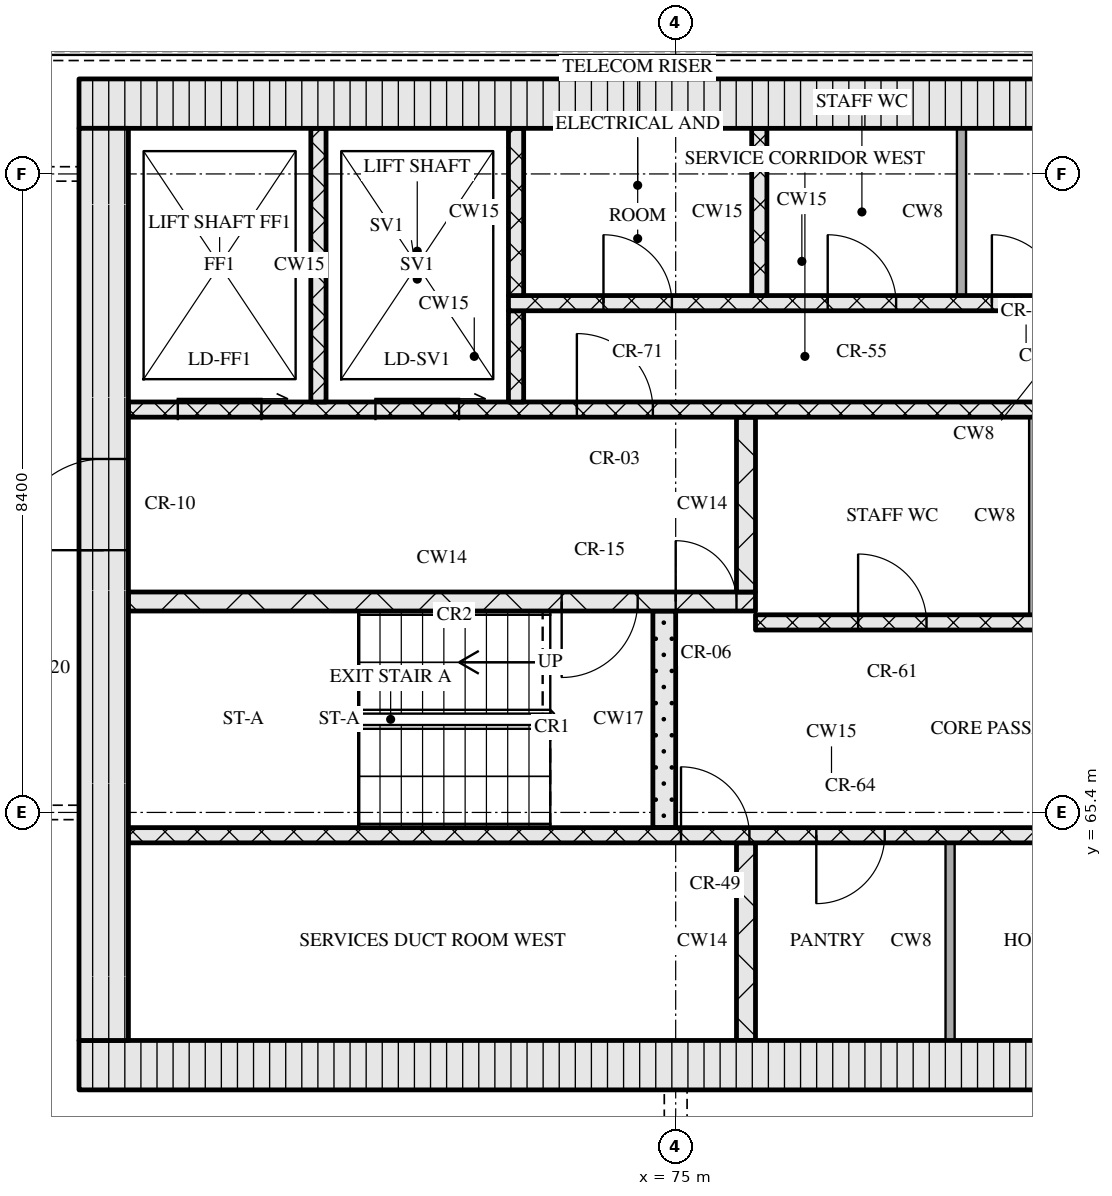
"""IFC4 building model, lengths in metres.
Left out: names, types, materials, properties, quantities, classifications, styles, units other than length and angle.
Written with IfcOpenShell. Run it as: python <this file> out.ifc"""

import sys

from ifc_helpers import new_model, si_unit, direction, frame, frame_2d, origin, place, context, subcontext, project, spatial, rectangle, extrude, element, fill, save


model = new_model("IFC4")
c1 = context("Model", 3, precision=1e-05, world=origin(), true_north=direction((0.0, 1.0)))
c2 = subcontext(c1, "Body", "Model", "MODEL_VIEW")
j1 = project(units=[si_unit("LENGTHUNIT", "METRE"), si_unit("PLANEANGLEUNIT", "RADIAN")], contexts=[c1])
p1 = place(None, origin())
s1 = spatial("IfcSite", under=j1, at=p1, CompositionType="ELEMENT")
p2 = place(p1, origin())
s2 = spatial("IfcBuilding", under=s1, at=p2, CompositionType="ELEMENT")
p3 = place(p2, frame((0.0, 0.0, 234.3)))
s3 = spatial("IfcBuildingStorey", under=s2, at=p3, CompositionType="ELEMENT", Elevation=234.3)
p4 = place(p3, frame((67.15, 62.075, 0.0), z_axis=(0.0, 0.0, 1.0), x_axis=(1.0, 0.0, 0.0)))
e1 = element("IfcWall", 1, at=p4, inside=s3, PredefinedType="SOLIDWALL", context=c2, shape_type="SweptSolid", body=[
    extrude(rectangle(XDim=40.9, YDim=0.65, at=frame_2d((20.45, 0.0))), origin(), (0.0, 0.0, 1.0), 3.32),
])
p5 = place(p4, frame((20.8, 0.0, 0.0)))
e2 = element("IfcOpeningElement", 2, at=p5, cuts=e1, PredefinedType="OPENING", context=c2, shape_type="SweptSolid", body=[
    extrude(rectangle(XDim=1.8, YDim=2.1, at=frame_2d((0.9, 1.05))), frame((0.0, 0.335, 0.0), z_axis=(0.0, -1.0, 0.0), x_axis=(1.0, 0.0, 0.0)), (0.0, 0.0, 1.0), 0.67),
])
p6 = place(p3, frame((67.15, 74.725, 0.0), z_axis=(0.0, 0.0, 1.0), x_axis=(1.0, 0.0, 0.0)))
e3 = element("IfcWall", 3, at=p6, inside=s3, PredefinedType="SOLIDWALL", context=c2, shape_type="SweptSolid", body=[
    extrude(rectangle(XDim=40.9, YDim=0.65, at=frame_2d((20.45, 0.0))), origin(), (0.0, 0.0, 1.0), 3.32),
])
p7 = place(p3, frame((67.475, 62.4, 0.0), z_axis=(0.0, 0.0, 1.0), x_axis=(0.0, 1.0, 0.0)))
e4 = element("IfcWall", 4, at=p7, inside=s3, PredefinedType="SOLIDWALL", context=c2, shape_type="SweptSolid", body=[
    extrude(rectangle(XDim=12.0, YDim=0.65, at=frame_2d((6.0, 0.0))), origin(), (0.0, 0.0, 1.0), 3.32),
])
p8 = place(p7, frame((6.45, 0.0, 0.0)))
e5 = element("IfcOpeningElement", 5, at=p8, cuts=e4, PredefinedType="OPENING", context=c2, shape_type="SweptSolid", body=[
    extrude(rectangle(XDim=1.2, YDim=2.1, at=frame_2d((0.6, 1.05))), frame((0.0, 0.335, 0.0), z_axis=(0.0, -1.0, 0.0), x_axis=(1.0, 0.0, 0.0)), (0.0, 0.0, 1.0), 0.67),
])
p9 = place(p3, frame((75.925, 62.4, 0.0), z_axis=(0.0, 0.0, 1.0), x_axis=(0.0, 1.0, 0.0)))
e6 = element("IfcWall", 6, at=p9, inside=s3, PredefinedType="SOLIDWALL", context=c2, shape_type="SweptSolid", body=[
    extrude(rectangle(XDim=2.6, YDim=0.25, at=frame_2d((1.3, 0.0))), origin(), (0.0, 0.0, 1.0), 3.32),
])
p10 = place(p3, frame((78.61, 62.4, 0.0), z_axis=(0.0, 0.0, 1.0), x_axis=(0.0, 1.0, 0.0)))
e7 = element("IfcWall", 7, at=p10, inside=s3, PredefinedType="PARTITIONING", context=c2, shape_type="SweptSolid", body=[
    extrude(rectangle(XDim=2.6, YDim=0.12, at=frame_2d((1.3, 0.0))), origin(), (0.0, 0.0, 1.0), 3.32),
])
p11 = place(p3, frame((67.8, 65.1, 0.0), z_axis=(0.0, 0.0, 1.0), x_axis=(1.0, 0.0, 0.0)))
e8 = element("IfcWall", 8, at=p11, inside=s3, PredefinedType="SOLIDWALL", context=c2, shape_type="SweptSolid", body=[
    extrude(rectangle(XDim=18.5, YDim=0.2, at=frame_2d((9.25, 0.0))), origin(), (0.0, 0.0, 1.0), 3.32),
])
p12 = place(p11, frame((7.27, 0.0, 0.0)))
e9 = element("IfcOpeningElement", 9, at=p12, cuts=e8, PredefinedType="OPENING", context=c2, shape_type="SweptSolid", body=[
    extrude(rectangle(XDim=0.9, YDim=2.1, at=frame_2d((0.45, 1.05))), frame((0.0, 0.11, 0.0), z_axis=(0.0, -1.0, 0.0), x_axis=(1.0, 0.0, 0.0)), (0.0, 0.0, 1.0), 0.22),
])
p13 = place(p11, frame((9.05, 0.0, 0.0)))
e10 = element("IfcOpeningElement", 10, at=p13, cuts=e8, PredefinedType="OPENING", context=c2, shape_type="SweptSolid", body=[
    extrude(rectangle(XDim=0.9, YDim=2.1, at=frame_2d((0.45, 1.05))), frame((0.0, 0.11, 0.0), z_axis=(0.0, -1.0, 0.0), x_axis=(1.0, 0.0, 0.0)), (0.0, 0.0, 1.0), 0.22),
])
p14 = place(p11, frame((12.76, 0.0, 0.0)))
e11 = element("IfcOpeningElement", 11, at=p14, cuts=e8, PredefinedType="OPENING", context=c2, shape_type="SweptSolid", body=[
    extrude(rectangle(XDim=0.9, YDim=2.1, at=frame_2d((0.45, 1.05))), frame((0.0, 0.11, 0.0), z_axis=(0.0, -1.0, 0.0), x_axis=(1.0, 0.0, 0.0)), (0.0, 0.0, 1.0), 0.22),
])
p15 = place(p11, frame((16.7, 0.0, 0.0)))
e12 = element("IfcOpeningElement", 12, at=p15, cuts=e8, PredefinedType="OPENING", context=c2, shape_type="SweptSolid", body=[
    extrude(rectangle(XDim=0.9, YDim=2.1, at=frame_2d((0.45, 1.05))), frame((0.0, 0.11, 0.0), z_axis=(0.0, -1.0, 0.0), x_axis=(1.0, 0.0, 0.0)), (0.0, 0.0, 1.0), 0.22),
])
p16 = place(p3, frame((74.85, 65.2, 0.0), z_axis=(0.0, 0.0, 1.0), x_axis=(0.0, 1.0, 0.0)))
e13 = element("IfcWall", 13, at=p16, inside=s3, PredefinedType="SOLIDWALL", context=c2, shape_type="SweptSolid", body=[
    extrude(rectangle(XDim=2.85, YDim=0.3, at=frame_2d((1.425, 0.0))), origin(), (0.0, 0.0, 1.0), 3.32),
])
p17 = place(p3, frame((76.05, 67.9, 0.0), z_axis=(0.0, 0.0, 1.0), x_axis=(1.0, 0.0, 0.0)))
e14 = element("IfcWall", 14, at=p17, inside=s3, PredefinedType="SOLIDWALL", context=c2, shape_type="SweptSolid", body=[
    extrude(rectangle(XDim=23.1, YDim=0.2, at=frame_2d((11.55, 0.0))), origin(), (0.0, 0.0, 1.0), 3.32),
])
p18 = place(p17, frame((1.35, 0.0, 0.0)))
e15 = element("IfcOpeningElement", 15, at=p18, cuts=e14, PredefinedType="OPENING", context=c2, shape_type="SweptSolid", body=[
    extrude(rectangle(XDim=0.9, YDim=2.1, at=frame_2d((0.45, 1.05))), frame((0.0, 0.11, 0.0), z_axis=(0.0, -1.0, 0.0), x_axis=(1.0, 0.0, 0.0)), (0.0, 0.0, 1.0), 0.22),
])
p19 = place(p17, frame((5.06, 0.0, 0.0)))
e16 = element("IfcOpeningElement", 16, at=p19, cuts=e14, PredefinedType="OPENING", context=c2, shape_type="SweptSolid", body=[
    extrude(rectangle(XDim=0.9, YDim=2.1, at=frame_2d((0.45, 1.05))), frame((0.0, 0.11, 0.0), z_axis=(0.0, -1.0, 0.0), x_axis=(1.0, 0.0, 0.0)), (0.0, 0.0, 1.0), 0.22),
])
p20 = place(p17, frame((8.45, 0.0, 0.0)))
e17 = element("IfcOpeningElement", 17, at=p20, cuts=e14, PredefinedType="OPENING", context=c2, shape_type="SweptSolid", body=[
    extrude(rectangle(XDim=0.9, YDim=2.1, at=frame_2d((0.45, 1.05))), frame((0.0, 0.11, 0.0), z_axis=(0.0, -1.0, 0.0), x_axis=(1.0, 0.0, 0.0)), (0.0, 0.0, 1.0), 0.22),
])
p21 = place(p17, frame((10.91, 0.0, 0.0)))
e18 = element("IfcOpeningElement", 18, at=p21, cuts=e14, PredefinedType="OPENING", context=c2, shape_type="SweptSolid", body=[
    extrude(rectangle(XDim=0.9, YDim=2.1, at=frame_2d((0.45, 1.05))), frame((0.0, 0.11, 0.0), z_axis=(0.0, -1.0, 0.0), x_axis=(1.0, 0.0, 0.0)), (0.0, 0.0, 1.0), 0.22),
])
p22 = place(p17, frame((13.55, 0.0, 0.0)))
e19 = element("IfcOpeningElement", 19, at=p22, cuts=e14, PredefinedType="OPENING", context=c2, shape_type="SweptSolid", body=[
    extrude(rectangle(XDim=1.0, YDim=2.1, at=frame_2d((0.5, 1.05))), frame((0.0, 0.11, 0.0), z_axis=(0.0, -1.0, 0.0), x_axis=(1.0, 0.0, 0.0)), (0.0, 0.0, 1.0), 0.22),
])
p23 = place(p17, frame((16.2, 0.0, 0.0)))
e20 = element("IfcOpeningElement", 20, at=p23, cuts=e14, PredefinedType="OPENING", context=c2, shape_type="SweptSolid", body=[
    extrude(rectangle(XDim=1.1, YDim=2.1, at=frame_2d((0.55, 1.05))), frame((0.0, 0.11, 0.0), z_axis=(0.0, -1.0, 0.0), x_axis=(1.0, 0.0, 0.0)), (0.0, 0.0, 1.0), 0.22),
])
p24 = place(p17, frame((18.7, 0.0, 0.0)))
e21 = element("IfcOpeningElement", 21, at=p24, cuts=e14, PredefinedType="OPENING", context=c2, shape_type="SweptSolid", body=[
    extrude(rectangle(XDim=1.1, YDim=2.1, at=frame_2d((0.55, 1.05))), frame((0.0, 0.11, 0.0), z_axis=(0.0, -1.0, 0.0), x_axis=(1.0, 0.0, 0.0)), (0.0, 0.0, 1.0), 0.22),
])
p25 = place(p17, frame((21.2, 0.0, 0.0)))
e22 = element("IfcOpeningElement", 22, at=p25, cuts=e14, PredefinedType="OPENING", context=c2, shape_type="SweptSolid", body=[
    extrude(rectangle(XDim=1.1, YDim=2.1, at=frame_2d((0.55, 1.05))), frame((0.0, 0.11, 0.0), z_axis=(0.0, -1.0, 0.0), x_axis=(1.0, 0.0, 0.0)), (0.0, 0.0, 1.0), 0.22),
])
p26 = place(p3, frame((79.71, 68.0, 0.0), z_axis=(0.0, 0.0, 1.0), x_axis=(0.0, 1.0, 0.0)))
e23 = element("IfcWall", 23, at=p26, inside=s3, PredefinedType="PARTITIONING", context=c2, shape_type="SweptSolid", body=[
    extrude(rectangle(XDim=2.6, YDim=0.12, at=frame_2d((1.3, 0.0))), origin(), (0.0, 0.0, 1.0), 3.32),
])
p27 = place(p3, frame((67.8, 68.175, 0.0), z_axis=(0.0, 0.0, 1.0), x_axis=(1.0, 0.0, 0.0)))
e24 = element("IfcWall", 24, at=p27, inside=s3, PredefinedType="SOLIDWALL", context=c2, shape_type="SweptSolid", body=[
    extrude(rectangle(XDim=8.25, YDim=0.25, at=frame_2d((4.125, 0.0))), origin(), (0.0, 0.0, 1.0), 3.32),
])
p28 = place(p27, frame((5.7, 0.0, 0.0)))
e25 = element("IfcOpeningElement", 25, at=p28, cuts=e24, PredefinedType="OPENING", context=c2, shape_type="SweptSolid", body=[
    extrude(rectangle(XDim=1.0, YDim=2.1, at=frame_2d((0.5, 1.05))), frame((0.0, 0.135, 0.0), z_axis=(0.0, -1.0, 0.0), x_axis=(1.0, 0.0, 0.0)), (0.0, 0.0, 1.0), 0.27),
])
p29 = place(p27, frame((7.2, 0.0, 0.0)))
e26 = element("IfcOpeningElement", 26, at=p29, cuts=e24, PredefinedType="OPENING", context=c2, shape_type="SweptSolid", body=[
    extrude(rectangle(XDim=0.8, YDim=2.1, at=frame_2d((0.4, 1.05))), frame((0.0, 0.135, 0.0), z_axis=(0.0, -1.0, 0.0), x_axis=(1.0, 0.0, 0.0)), (0.0, 0.0, 1.0), 0.27),
])
p30 = place(p3, frame((75.925, 68.3, 0.0), z_axis=(0.0, 0.0, 1.0), x_axis=(0.0, 1.0, 0.0)))
e27 = element("IfcWall", 27, at=p30, inside=s3, PredefinedType="SOLIDWALL", context=c2, shape_type="SweptSolid", body=[
    extrude(rectangle(XDim=2.3, YDim=0.25, at=frame_2d((1.15, 0.0))), origin(), (0.0, 0.0, 1.0), 3.32),
])
p31 = place(p3, frame((67.8, 70.7, 0.0), z_axis=(0.0, 0.0, 1.0), x_axis=(1.0, 0.0, 0.0)))
e28 = element("IfcWall", 28, at=p31, inside=s3, PredefinedType="SOLIDWALL", context=c2, shape_type="SweptSolid", body=[
    extrude(rectangle(XDim=39.6, YDim=0.2, at=frame_2d((19.8, 0.0))), origin(), (0.0, 0.0, 1.0), 3.32),
])
p32 = place(p31, frame((0.65, 0.0, 0.0)))
e29 = element("IfcOpeningElement", 29, at=p32, cuts=e28, PredefinedType="OPENING", context=c2, shape_type="SweptSolid", body=[
    extrude(rectangle(XDim=1.1, YDim=2.1, at=frame_2d((0.55, 1.05))), frame((0.0, 0.11, 0.0), z_axis=(0.0, -1.0, 0.0), x_axis=(1.0, 0.0, 0.0)), (0.0, 0.0, 1.0), 0.22),
])
p33 = place(p31, frame((3.25, 0.0, 0.0)))
e30 = element("IfcOpeningElement", 30, at=p33, cuts=e28, PredefinedType="OPENING", context=c2, shape_type="SweptSolid", body=[
    extrude(rectangle(XDim=1.1, YDim=2.1, at=frame_2d((0.55, 1.05))), frame((0.0, 0.11, 0.0), z_axis=(0.0, -1.0, 0.0), x_axis=(1.0, 0.0, 0.0)), (0.0, 0.0, 1.0), 0.22),
])
p34 = place(p31, frame((5.9, 0.0, 0.0)))
e31 = element("IfcOpeningElement", 31, at=p34, cuts=e28, PredefinedType="OPENING", context=c2, shape_type="SweptSolid", body=[
    extrude(rectangle(XDim=1.0, YDim=2.1, at=frame_2d((0.5, 1.05))), frame((0.0, 0.11, 0.0), z_axis=(0.0, -1.0, 0.0), x_axis=(1.0, 0.0, 0.0)), (0.0, 0.0, 1.0), 0.22),
])
p35 = place(p31, frame((21.7, 0.0, 0.0)))
e32 = element("IfcOpeningElement", 32, at=p35, cuts=e28, PredefinedType="OPENING", context=c2, shape_type="SweptSolid", body=[
    extrude(rectangle(XDim=1.0, YDim=2.1, at=frame_2d((0.5, 1.05))), frame((0.0, 0.11, 0.0), z_axis=(0.0, -1.0, 0.0), x_axis=(1.0, 0.0, 0.0)), (0.0, 0.0, 1.0), 0.22),
])
p36 = place(p31, frame((32.7, 0.0, 0.0)))
e33 = element("IfcOpeningElement", 33, at=p36, cuts=e28, PredefinedType="OPENING", context=c2, shape_type="SweptSolid", body=[
    extrude(rectangle(XDim=1.0, YDim=2.1, at=frame_2d((0.5, 1.05))), frame((0.0, 0.11, 0.0), z_axis=(0.0, -1.0, 0.0), x_axis=(1.0, 0.0, 0.0)), (0.0, 0.0, 1.0), 0.22),
])
p37 = place(p31, frame((35.25, 0.0, 0.0)))
e34 = element("IfcOpeningElement", 34, at=p37, cuts=e28, PredefinedType="OPENING", context=c2, shape_type="SweptSolid", body=[
    extrude(rectangle(XDim=1.1, YDim=2.1, at=frame_2d((0.55, 1.05))), frame((0.0, 0.11, 0.0), z_axis=(0.0, -1.0, 0.0), x_axis=(1.0, 0.0, 0.0)), (0.0, 0.0, 1.0), 0.22),
])
p38 = place(p31, frame((37.85, 0.0, 0.0)))
e35 = element("IfcOpeningElement", 35, at=p38, cuts=e28, PredefinedType="OPENING", context=c2, shape_type="SweptSolid", body=[
    extrude(rectangle(XDim=1.1, YDim=2.1, at=frame_2d((0.55, 1.05))), frame((0.0, 0.11, 0.0), z_axis=(0.0, -1.0, 0.0), x_axis=(1.0, 0.0, 0.0)), (0.0, 0.0, 1.0), 0.22),
])
p39 = place(p3, frame((70.3, 70.8, 0.0), z_axis=(0.0, 0.0, 1.0), x_axis=(0.0, 1.0, 0.0)))
e36 = element("IfcWall", 36, at=p39, inside=s3, PredefinedType="SOLIDWALL", context=c2, shape_type="SweptSolid", body=[
    extrude(rectangle(XDim=3.6, YDim=0.2, at=frame_2d((1.8, 0.0))), origin(), (0.0, 0.0, 1.0), 3.32),
])
p40 = place(p3, frame((72.9, 70.8, 0.0), z_axis=(0.0, 0.0, 1.0), x_axis=(0.0, 1.0, 0.0)))
e37 = element("IfcWall", 37, at=p40, inside=s3, PredefinedType="SOLIDWALL", context=c2, shape_type="SweptSolid", body=[
    extrude(rectangle(XDim=1.2, YDim=0.2, at=frame_2d((0.6, 0.0))), origin(), (0.0, 0.0, 1.0), 3.32),
])
p41 = place(p3, frame((72.8, 72.1, 0.0), z_axis=(0.0, 0.0, 1.0), x_axis=(1.0, 0.0, 0.0)))
e38 = element("IfcWall", 38, at=p41, inside=s3, PredefinedType="SOLIDWALL", context=c2, shape_type="SweptSolid", body=[
    extrude(rectangle(XDim=7.72, YDim=0.2, at=frame_2d((3.86, 0.0))), origin(), (0.0, 0.0, 1.0), 3.32),
])
p42 = place(p41, frame((1.25, 0.0, 0.0)))
e39 = element("IfcOpeningElement", 39, at=p42, cuts=e38, PredefinedType="OPENING", context=c2, shape_type="SweptSolid", body=[
    extrude(rectangle(XDim=0.9, YDim=2.1, at=frame_2d((0.45, 1.05))), frame((0.0, 0.11, 0.0), z_axis=(0.0, -1.0, 0.0), x_axis=(1.0, 0.0, 0.0)), (0.0, 0.0, 1.0), 0.22),
])
p43 = place(p41, frame((4.2, 0.0, 0.0)))
e40 = element("IfcOpeningElement", 40, at=p43, cuts=e38, PredefinedType="OPENING", context=c2, shape_type="SweptSolid", body=[
    extrude(rectangle(XDim=0.9, YDim=2.1, at=frame_2d((0.45, 1.05))), frame((0.0, 0.11, 0.0), z_axis=(0.0, -1.0, 0.0), x_axis=(1.0, 0.0, 0.0)), (0.0, 0.0, 1.0), 0.22),
])
p44 = place(p41, frame((6.36, 0.0, 0.0)))
e41 = element("IfcOpeningElement", 41, at=p44, cuts=e38, PredefinedType="OPENING", context=c2, shape_type="SweptSolid", body=[
    extrude(rectangle(XDim=0.9, YDim=2.1, at=frame_2d((0.45, 1.05))), frame((0.0, 0.11, 0.0), z_axis=(0.0, -1.0, 0.0), x_axis=(1.0, 0.0, 0.0)), (0.0, 0.0, 1.0), 0.22),
])
for number, where, z_axis, x_axis in (
    (42, (72.9, 72.2, 0.0), (0.0, 0.0, 1.0), (0.0, 1.0, 0.0)),
    (43, (76.1, 72.2, 0.0), (0.0, 0.0, 1.0), (0.0, 1.0, 0.0)),
):
    element("IfcWall", number, at=place(p3, frame(where, z_axis=z_axis, x_axis=x_axis)), inside=s3, PredefinedType="SOLIDWALL", context=c2, shape_type="SweptSolid", body=[
        extrude(rectangle(XDim=2.2, YDim=0.2, at=frame_2d((1.1, 0.0))), origin(), (0.0, 0.0, 1.0), 3.32),
    ])
p45 = place(p3, frame((78.76, 72.2, 0.0), z_axis=(0.0, 0.0, 1.0), x_axis=(0.0, 1.0, 0.0)))
e44 = element("IfcWall", 44, at=p45, inside=s3, PredefinedType="PARTITIONING", context=c2, shape_type="SweptSolid", body=[
    extrude(rectangle(XDim=2.2, YDim=0.12, at=frame_2d((1.1, 0.0))), origin(), (0.0, 0.0, 1.0), 3.32),
])
p46 = place(p12, origin())
e45 = element("IfcDoor", 45, at=p46, inside=s3, OperationType="SINGLE_SWING_LEFT", PredefinedType="DOOR", context=c2, shape_type="SweptSolid", body=[
    extrude(rectangle(XDim=0.9, YDim=2.1, at=frame_2d((0.45, 1.05))), frame((0.0, 0.025, 0.0), z_axis=(0.0, -1.0, 0.0), x_axis=(1.0, 0.0, 0.0)), (0.0, 0.0, 1.0), 0.05),
])
fill(e9, e45)
p47 = place(p13, origin())
e46 = element("IfcDoor", 46, at=p47, inside=s3, OperationType="SINGLE_SWING_RIGHT", PredefinedType="DOOR", context=c2, shape_type="SweptSolid", body=[
    extrude(rectangle(XDim=0.9, YDim=2.1, at=frame_2d((0.45, 1.05))), frame((0.0, 0.025, 0.0), z_axis=(0.0, -1.0, 0.0), x_axis=(1.0, 0.0, 0.0)), (0.0, 0.0, 1.0), 0.05),
])
fill(e10, e46)
p48 = place(p18, origin())
e47 = element("IfcDoor", 47, at=p48, inside=s3, OperationType="SINGLE_SWING_LEFT", PredefinedType="DOOR", context=c2, shape_type="SweptSolid", body=[
    extrude(rectangle(XDim=0.9, YDim=2.1, at=frame_2d((0.45, 1.05))), frame((0.0, 0.025, 0.0), z_axis=(0.0, -1.0, 0.0), x_axis=(1.0, 0.0, 0.0)), (0.0, 0.0, 1.0), 0.05),
])
fill(e15, e47)
p49 = place(p28, origin())
e48 = element("IfcDoor", 48, at=p49, inside=s3, OperationType="SINGLE_SWING_RIGHT", PredefinedType="DOOR", context=c2, shape_type="SweptSolid", body=[
    extrude(rectangle(XDim=1.0, YDim=2.1, at=frame_2d((0.5, 1.05))), frame((0.0, 0.025, 0.0), z_axis=(0.0, -1.0, 0.0), x_axis=(1.0, 0.0, 0.0)), (0.0, 0.0, 1.0), 0.05),
])
fill(e25, e48)
p50 = place(p29, origin())
e49 = element("IfcDoor", 49, at=p50, inside=s3, OperationType="SINGLE_SWING_LEFT", PredefinedType="DOOR", context=c2, shape_type="SweptSolid", body=[
    extrude(rectangle(XDim=0.8, YDim=2.1, at=frame_2d((0.4, 1.05))), frame((0.0, 0.025, 0.0), z_axis=(0.0, -1.0, 0.0), x_axis=(1.0, 0.0, 0.0)), (0.0, 0.0, 1.0), 0.05),
])
fill(e26, e49)
p51 = place(p8, origin())
e50 = element("IfcDoor", 50, at=p51, inside=s3, OperationType="SINGLE_SWING_LEFT", PredefinedType="DOOR", context=c2, shape_type="SweptSolid", body=[
    extrude(rectangle(XDim=1.2, YDim=2.1, at=frame_2d((0.6, 1.05))), frame((0.0, 0.025, 0.0), z_axis=(0.0, -1.0, 0.0), x_axis=(1.0, 0.0, 0.0)), (0.0, 0.0, 1.0), 0.05),
])
fill(e5, e50)
p52 = place(p32, origin())
e51 = element("IfcDoor", 51, at=p52, inside=s3, OperationType="SLIDING_TO_RIGHT", PredefinedType="DOOR", context=c2, shape_type="SweptSolid", body=[
    extrude(rectangle(XDim=1.1, YDim=2.1, at=frame_2d((0.55, 1.05))), frame((0.0, 0.025, 0.0), z_axis=(0.0, -1.0, 0.0), x_axis=(1.0, 0.0, 0.0)), (0.0, 0.0, 1.0), 0.05),
])
fill(e29, e51)
p53 = place(p33, origin())
e52 = element("IfcDoor", 52, at=p53, inside=s3, OperationType="SLIDING_TO_RIGHT", PredefinedType="DOOR", context=c2, shape_type="SweptSolid", body=[
    extrude(rectangle(XDim=1.1, YDim=2.1, at=frame_2d((0.55, 1.05))), frame((0.0, 0.025, 0.0), z_axis=(0.0, -1.0, 0.0), x_axis=(1.0, 0.0, 0.0)), (0.0, 0.0, 1.0), 0.05),
])
fill(e30, e52)
p54 = place(p34, origin())
e53 = element("IfcDoor", 53, at=p54, inside=s3, OperationType="SINGLE_SWING_LEFT", PredefinedType="DOOR", context=c2, shape_type="SweptSolid", body=[
    extrude(rectangle(XDim=1.0, YDim=2.1, at=frame_2d((0.5, 1.05))), frame((0.0, 0.025, 0.0), z_axis=(0.0, -1.0, 0.0), x_axis=(1.0, 0.0, 0.0)), (0.0, 0.0, 1.0), 0.05),
])
fill(e31, e53)
p55 = place(p42, origin())
e54 = element("IfcDoor", 54, at=p55, inside=s3, OperationType="SINGLE_SWING_LEFT", PredefinedType="DOOR", context=c2, shape_type="SweptSolid", body=[
    extrude(rectangle(XDim=0.9, YDim=2.1, at=frame_2d((0.45, 1.05))), frame((0.0, 0.025, 0.0), z_axis=(0.0, -1.0, 0.0), x_axis=(1.0, 0.0, 0.0)), (0.0, 0.0, 1.0), 0.05),
])
fill(e39, e54)
p56 = place(p43, origin())
e55 = element("IfcDoor", 55, at=p56, inside=s3, OperationType="SINGLE_SWING_LEFT", PredefinedType="DOOR", context=c2, shape_type="SweptSolid", body=[
    extrude(rectangle(XDim=0.9, YDim=2.1, at=frame_2d((0.45, 1.05))), frame((0.0, 0.025, 0.0), z_axis=(0.0, -1.0, 0.0), x_axis=(1.0, 0.0, 0.0)), (0.0, 0.0, 1.0), 0.05),
])
fill(e40, e55)
p57 = place(p44, origin())
e56 = element("IfcDoor", 56, at=p57, inside=s3, OperationType="SINGLE_SWING_LEFT", PredefinedType="DOOR", context=c2, shape_type="SweptSolid", body=[
    extrude(rectangle(XDim=0.9, YDim=2.1, at=frame_2d((0.45, 1.05))), frame((0.0, 0.025, 0.0), z_axis=(0.0, -1.0, 0.0), x_axis=(1.0, 0.0, 0.0)), (0.0, 0.0, 1.0), 0.05),
])
fill(e41, e56)
save(model, sys.argv[1])
